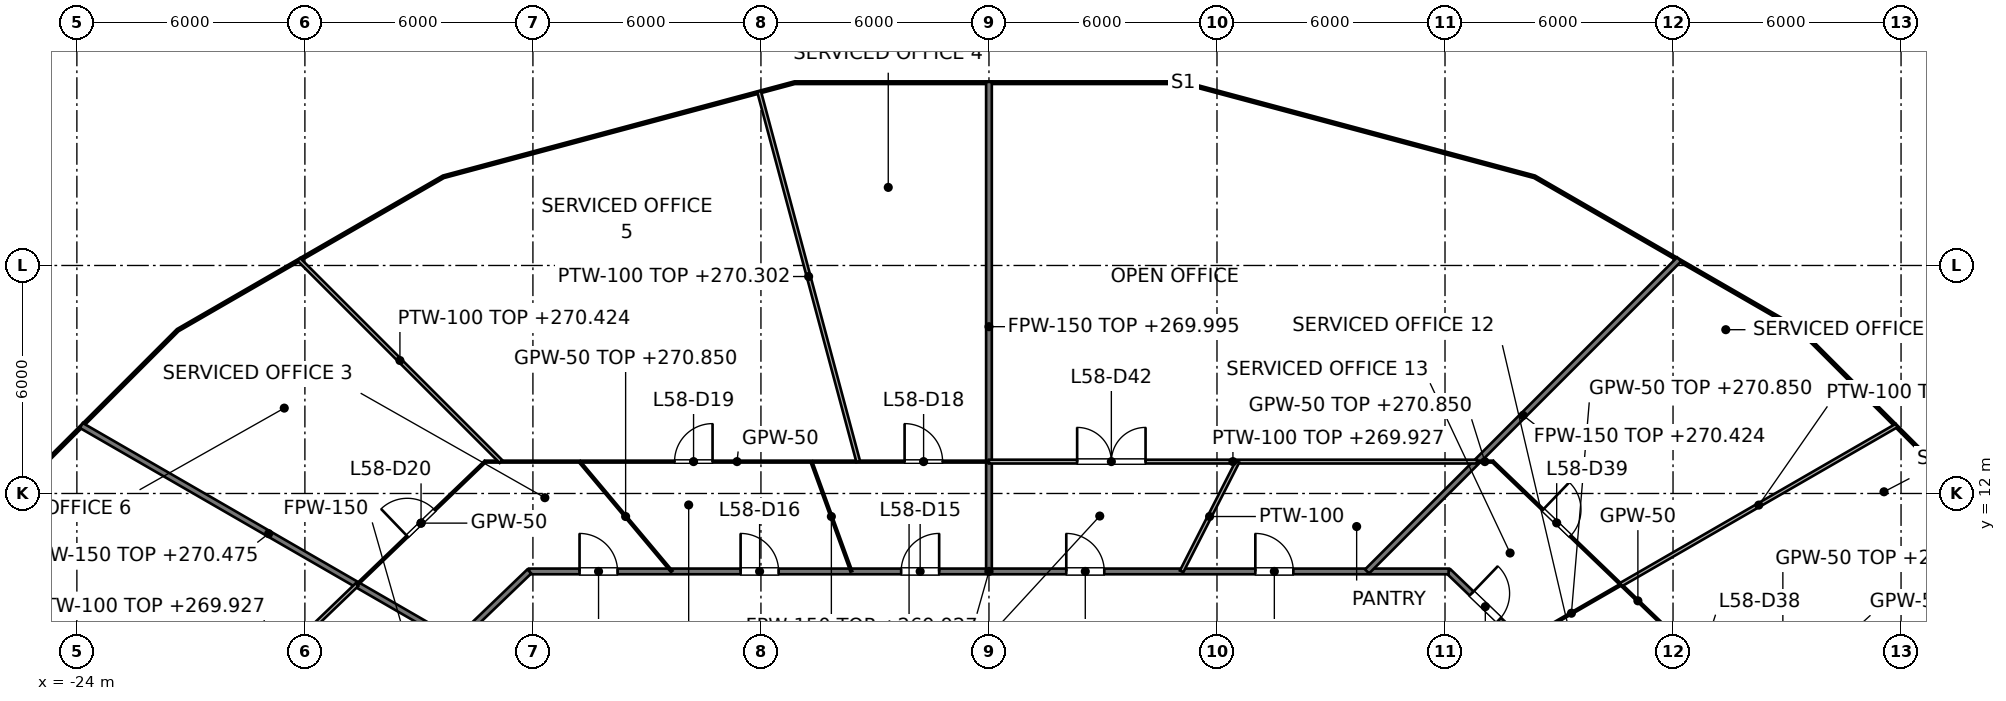
"""IFC4 building model, lengths in metres.
Left out: names, types, materials, properties, quantities, classifications, styles, units other than length and angle.
Written with IfcOpenShell. Run it as: python <this file> out.ifc"""

import sys

from ifc_helpers import new_model, si_unit, direction, frame, frame_2d, origin, place, context, subcontext, project, spatial, rectangle, extrude, element, fill, save


model = new_model("IFC4")
c1 = context("Model", 3, precision=1e-05, world=origin(), true_north=direction((0.0, 1.0)))
c2 = subcontext(c1, "Body", "Model", "MODEL_VIEW")
j1 = project(units=[si_unit("LENGTHUNIT", "METRE"), si_unit("PLANEANGLEUNIT", "RADIAN")], contexts=[c1])
p1 = place(None, origin())
s1 = spatial("IfcSite", under=j1, at=p1, CompositionType="ELEMENT")
p2 = place(p1, origin())
s2 = spatial("IfcBuilding", under=s1, at=p2, CompositionType="ELEMENT")
p3 = place(p2, frame((0.0, 0.0, 267.0)))
s3 = spatial("IfcBuildingStorey", under=s2, at=p3, CompositionType="ELEMENT", Elevation=267.0)
p4 = place(p3, frame((12.095, 9.949, 0.0), z_axis=(0.0, 0.0, 1.0), x_axis=(0.721290181137, -0.692633001376, 0.0)))
e1 = element("IfcWall", 1, at=p4, inside=s3, PredefinedType="PARTITIONING", context=c2, shape_type="SweptSolid", body=[
    extrude(rectangle(XDim=8.187, YDim=0.15, at=frame_2d((4.094, 0.0))), origin(), (0.0, 0.0, 1.0), 2.918),
])
p5 = place(p4, frame((3.232, 0.0, 0.0)))
e2 = element("IfcOpeningElement", 2, at=p5, cuts=e1, PredefinedType="OPENING", context=c2, shape_type="SweptSolid", body=[
    extrude(rectangle(XDim=1.0, YDim=2.1, at=frame_2d((0.5, 1.05))), frame((0.0, 0.075, 0.0), z_axis=(0.0, -1.0, 0.0), x_axis=(1.0, 0.0, 0.0)), (0.0, 0.0, 1.0), 0.15),
])
p6 = place(p4, frame((0.839, 0.0, 0.0)))
e3 = element("IfcOpeningElement", 3, at=p6, cuts=e1, PredefinedType="OPENING", context=c2, shape_type="SweptSolid", body=[
    extrude(rectangle(XDim=1.0, YDim=2.1, at=frame_2d((0.5, 1.05))), frame((0.0, 0.075, 0.0), z_axis=(0.0, -1.0, 0.0), x_axis=(1.0, 0.0, 0.0)), (0.0, 0.0, 1.0), 0.15),
])
p7 = place(p3, frame((-23.883, 13.789, 0.0), z_axis=(0.0, 0.0, 1.0), x_axis=(0.866026665955, -0.499997813851, 0.0)))
e4 = element("IfcWall", 4, at=p7, inside=s3, PredefinedType="PARTITIONING", context=c2, shape_type="SweptSolid", body=[
    extrude(rectangle(XDim=11.384, YDim=0.15, at=frame_2d((5.692, 0.0))), origin(), (0.0, 0.0, 1.0), 3.475),
])
p8 = place(p3, frame((-12.095, 9.949, 0.0), z_axis=(0.0, 0.0, 1.0), x_axis=(1.0, 0.0, 0.0)))
e5 = element("IfcWall", 5, at=p8, inside=s3, PredefinedType="PARTITIONING", context=c2, shape_type="SweptSolid", body=[
    extrude(rectangle(XDim=24.19, YDim=0.15, at=frame_2d((12.095, 0.0))), origin(), (0.0, 0.0, 1.0), 2.927),
])
p9 = place(p8, frame((9.784, 0.0, 0.0)))
e6 = element("IfcOpeningElement", 6, at=p9, cuts=e5, PredefinedType="OPENING", context=c2, shape_type="SweptSolid", body=[
    extrude(rectangle(XDim=1.0, YDim=2.1, at=frame_2d((0.5, 1.05))), frame((0.0, 0.075, 0.0), z_axis=(0.0, -1.0, 0.0), x_axis=(1.0, 0.0, 0.0)), (0.0, 0.0, 1.0), 0.15),
])
p10 = place(p8, frame((5.56, 0.0, 0.0)))
e7 = element("IfcOpeningElement", 7, at=p10, cuts=e5, PredefinedType="OPENING", context=c2, shape_type="SweptSolid", body=[
    extrude(rectangle(XDim=1.0, YDim=2.1, at=frame_2d((0.5, 1.05))), frame((0.0, 0.075, 0.0), z_axis=(0.0, -1.0, 0.0), x_axis=(1.0, 0.0, 0.0)), (0.0, 0.0, 1.0), 0.15),
])
p11 = place(p8, frame((1.322, 0.0, 0.0)))
e8 = element("IfcOpeningElement", 8, at=p11, cuts=e5, PredefinedType="OPENING", context=c2, shape_type="SweptSolid", body=[
    extrude(rectangle(XDim=1.0, YDim=2.1, at=frame_2d((0.5, 1.05))), frame((0.0, 0.075, 0.0), z_axis=(0.0, -1.0, 0.0), x_axis=(1.0, 0.0, 0.0)), (0.0, 0.0, 1.0), 0.15),
])
p12 = place(p8, frame((19.104, 0.0, 0.0)))
e9 = element("IfcOpeningElement", 9, at=p12, cuts=e5, PredefinedType="OPENING", context=c2, shape_type="SweptSolid", body=[
    extrude(rectangle(XDim=1.0, YDim=2.1, at=frame_2d((0.5, 1.05))), frame((0.0, 0.075, 0.0), z_axis=(0.0, -1.0, 0.0), x_axis=(1.0, 0.0, 0.0)), (0.0, 0.0, 1.0), 0.15),
])
p13 = place(p8, frame((14.129, 0.0, 0.0)))
e10 = element("IfcOpeningElement", 10, at=p13, cuts=e5, PredefinedType="OPENING", context=c2, shape_type="SweptSolid", body=[
    extrude(rectangle(XDim=1.0, YDim=2.1, at=frame_2d((0.5, 1.05))), frame((0.0, 0.075, 0.0), z_axis=(0.0, -1.0, 0.0), x_axis=(1.0, 0.0, 0.0)), (0.0, 0.0, 1.0), 0.15),
])
p14 = place(p3, frame((-18.0, 4.278, 0.0), z_axis=(0.0, 0.0, 1.0), x_axis=(0.721260976692, 0.69266341285, 0.0)))
e11 = element("IfcWall", 11, at=p14, inside=s3, PredefinedType="PARTITIONING", context=c2, shape_type="SweptSolid", body=[
    extrude(rectangle(XDim=8.187, YDim=0.15, at=frame_2d((4.094, 0.0))), origin(), (0.0, 0.0, 1.0), 2.918),
])
p15 = place(p14, frame((3.544, 0.0, 0.0)))
e12 = element("IfcOpeningElement", 12, at=p15, cuts=e11, PredefinedType="OPENING", context=c2, shape_type="SweptSolid", body=[
    extrude(rectangle(XDim=1.0, YDim=2.1, at=frame_2d((0.5, 1.05))), frame((0.0, 0.075, 0.0), z_axis=(0.0, -1.0, 0.0), x_axis=(1.0, 0.0, 0.0)), (0.0, 0.0, 1.0), 0.15),
])
p16 = place(p3, frame((9.949, 9.949, 0.0), z_axis=(0.0, 0.0, 1.0), x_axis=(0.707106781187, 0.707106781187, 0.0)))
e13 = element("IfcWall", 13, at=p16, inside=s3, PredefinedType="PARTITIONING", context=c2, shape_type="SweptSolid", body=[
    extrude(rectangle(XDim=11.612, YDim=0.15, at=frame_2d((5.806, 0.0))), origin(), (0.0, 0.0, 1.0), 3.424),
])
p17 = place(p3, frame((0.0, 9.949, 0.0), z_axis=(0.0, 0.0, 1.0), x_axis=(0.0, 1.0, 0.0)))
e14 = element("IfcWall", 14, at=p17, inside=s3, PredefinedType="PARTITIONING", context=c2, shape_type="SweptSolid", body=[
    extrude(rectangle(XDim=12.881, YDim=0.15, at=frame_2d((6.44, 0.0))), origin(), (0.0, 0.0, 1.0), 2.995),
])
p18 = place(p3, frame((-4.673, 12.839, 0.0), z_axis=(0.0, 0.0, 1.0), x_axis=(0.342042598731, -0.939684447383, 0.0)))
e15 = element("IfcWall", 15, at=p18, inside=s3, PredefinedType="PARTITIONING", context=c2, shape_type="SweptSolid", body=[
    extrude(rectangle(XDim=3.076, YDim=0.05, at=frame_2d((1.538, 0.0))), origin(), (0.0, 0.0, 1.0), 3.85),
])
p19 = place(p3, frame((-10.773, 12.839, 0.0), z_axis=(0.0, 0.0, 1.0), x_axis=(0.642777681898, -0.766052773413, 0.0)))
e16 = element("IfcWall", 16, at=p19, inside=s3, PredefinedType="PARTITIONING", context=c2, shape_type="SweptSolid", body=[
    extrude(rectangle(XDim=3.773, YDim=0.05, at=frame_2d((1.886, 0.0))), origin(), (0.0, 0.0, 1.0), 3.85),
])
p20 = place(p3, frame((13.258, 12.839, 0.0), z_axis=(0.0, 0.0, 1.0), x_axis=(0.721469843217, -0.692445857327, 0.0)))
e17 = element("IfcWall", 17, at=p20, inside=s3, PredefinedType="PARTITIONING", context=c2, shape_type="SweptSolid", body=[
    extrude(rectangle(XDim=10.582, YDim=0.05, at=frame_2d((5.291, 0.0))), origin(), (0.0, 0.0, 1.0), 2.927),
])
p21 = place(p20, frame((7.072, 0.0, 0.0)))
e18 = element("IfcOpeningElement", 18, at=p21, cuts=e17, PredefinedType="OPENING", context=c2, shape_type="SweptSolid", body=[
    extrude(rectangle(XDim=1.0, YDim=2.1, at=frame_2d((0.5, 1.05))), frame((0.0, 0.025, 0.0), z_axis=(0.0, -1.0, 0.0), x_axis=(1.0, 0.0, 0.0)), (0.0, 0.0, 1.0), 0.05),
])
p22 = place(p20, frame((1.83, 0.0, 0.0)))
e19 = element("IfcOpeningElement", 19, at=p22, cuts=e17, PredefinedType="OPENING", context=c2, shape_type="SweptSolid", body=[
    extrude(rectangle(XDim=1.0, YDim=2.1, at=frame_2d((0.5, 1.05))), frame((0.0, 0.025, 0.0), z_axis=(0.0, -1.0, 0.0), x_axis=(1.0, 0.0, 0.0)), (0.0, 0.0, 1.0), 0.05),
])
p23 = place(p3, frame((-13.258, 12.839, 0.0), z_axis=(0.0, 0.0, 1.0), x_axis=(1.0, 0.0, 0.0)))
e20 = element("IfcWall", 20, at=p23, inside=s3, PredefinedType="PARTITIONING", context=c2, shape_type="SweptSolid", body=[
    extrude(rectangle(XDim=13.258, YDim=0.05, at=frame_2d((6.629, 0.0))), origin(), (0.0, 0.0, 1.0), 2.927),
])
p24 = place(p23, frame((11.038, 0.0, 0.0)))
e21 = element("IfcOpeningElement", 21, at=p24, cuts=e20, PredefinedType="OPENING", context=c2, shape_type="SweptSolid", body=[
    extrude(rectangle(XDim=1.0, YDim=2.1, at=frame_2d((0.5, 1.05))), frame((0.0, 0.025, 0.0), z_axis=(0.0, -1.0, 0.0), x_axis=(1.0, 0.0, 0.0)), (0.0, 0.0, 1.0), 0.05),
])
p25 = place(p23, frame((4.985, 0.0, 0.0)))
e22 = element("IfcOpeningElement", 22, at=p25, cuts=e20, PredefinedType="OPENING", context=c2, shape_type="SweptSolid", body=[
    extrude(rectangle(XDim=1.0, YDim=2.1, at=frame_2d((0.5, 1.05))), frame((0.0, 0.025, 0.0), z_axis=(0.0, -1.0, 0.0), x_axis=(1.0, 0.0, 0.0)), (0.0, 0.0, 1.0), 0.05),
])
p26 = place(p3, frame((12.839, 12.839, 0.0), z_axis=(0.0, 0.0, 1.0), x_axis=(1.0, 0.0, 0.0)))
e23 = element("IfcWall", 23, at=p26, inside=s3, PredefinedType="PARTITIONING", context=c2, shape_type="SweptSolid", body=[
    extrude(rectangle(XDim=0.419, YDim=0.05, at=frame_2d((0.209, 0.0))), origin(), (0.0, 0.0, 1.0), 3.85),
])
p27 = place(p3, frame((14.024, 8.097, 0.0), z_axis=(0.0, 0.0, 1.0), x_axis=(0.86600176378, 0.500040943453, 0.0)))
e24 = element("IfcWall", 24, at=p27, inside=s3, PredefinedType="PARTITIONING", context=c2, shape_type="SweptSolid", body=[
    extrude(rectangle(XDim=3.008, YDim=0.05, at=frame_2d((1.504, 0.0))), origin(), (0.0, 0.0, 1.0), 3.85),
])
p28 = place(p3, frame((-16.629, 9.601, 0.0), z_axis=(0.0, 0.0, 1.0), x_axis=(0.721171224294, 0.692756858681, 0.0)))
e25 = element("IfcWall", 25, at=p28, inside=s3, PredefinedType="PARTITIONING", context=c2, shape_type="SweptSolid", body=[
    extrude(rectangle(XDim=4.674, YDim=0.05, at=frame_2d((2.337, 0.0))), origin(), (0.0, 0.0, 1.0), 2.927),
])
p29 = place(p28, frame((1.837, 0.0, 0.0)))
e26 = element("IfcOpeningElement", 26, at=p29, cuts=e25, PredefinedType="OPENING", context=c2, shape_type="SweptSolid", body=[
    extrude(rectangle(XDim=1.0, YDim=2.1, at=frame_2d((0.5, 1.05))), frame((0.0, 0.025, 0.0), z_axis=(0.0, -1.0, 0.0), x_axis=(1.0, 0.0, 0.0)), (0.0, 0.0, 1.0), 0.05),
])
p30 = place(p3, frame((-6.05, 22.58, 0.0), z_axis=(0.0, 0.0, 1.0), x_axis=(0.258821194786, -0.965925250281, 0.0)))
e27 = element("IfcWall", 27, at=p30, inside=s3, PredefinedType="PARTITIONING", context=c2, shape_type="SweptSolid", body=[
    extrude(rectangle(XDim=10.085, YDim=0.1, at=frame_2d((5.042, 0.0))), origin(), (0.0, 0.0, 1.0), 3.302),
])
p31 = place(p3, frame((-18.16, 18.16, 0.0), z_axis=(0.0, 0.0, 1.0), x_axis=(0.707106781187, -0.707106781187, 0.0)))
e28 = element("IfcWall", 28, at=p31, inside=s3, PredefinedType="PARTITIONING", context=c2, shape_type="SweptSolid", body=[
    extrude(rectangle(XDim=7.525, YDim=0.1, at=frame_2d((3.762, 0.0))), origin(), (0.0, 0.0, 1.0), 3.424),
])
p32 = place(p3, frame((0.0, 12.839, 0.0), z_axis=(0.0, 0.0, 1.0), x_axis=(1.0, 0.0, 0.0)))
e29 = element("IfcWall", 29, at=p32, inside=s3, PredefinedType="PARTITIONING", context=c2, shape_type="SweptSolid", body=[
    extrude(rectangle(XDim=12.839, YDim=0.1, at=frame_2d((6.419, 0.0))), origin(), (0.0, 0.0, 1.0), 2.927),
])
p33 = place(p32, frame((2.32, 0.0, 0.0)))
e30 = element("IfcOpeningElement", 30, at=p33, cuts=e29, PredefinedType="OPENING", context=c2, shape_type="SweptSolid", body=[
    extrude(rectangle(XDim=1.8, YDim=2.1, at=frame_2d((0.9, 1.05))), frame((0.0, 0.05, 0.0), z_axis=(0.0, -1.0, 0.0), x_axis=(1.0, 0.0, 0.0)), (0.0, 0.0, 1.0), 0.1),
])
p34 = place(p3, frame((16.629, 9.601, 0.0), z_axis=(0.0, 0.0, 1.0), x_axis=(0.866035608203, 0.499982325013, 0.0)))
e31 = element("IfcWall", 31, at=p34, inside=s3, PredefinedType="PARTITIONING", context=c2, shape_type="SweptSolid", body=[
    extrude(rectangle(XDim=8.376, YDim=0.1, at=frame_2d((4.188, 0.0))), origin(), (0.0, 0.0, 1.0), 3.475),
])
p35 = place(p3, frame((-20.89, 5.509, 0.0), z_axis=(0.0, 0.0, 1.0), x_axis=(0.721200651506, 0.69272622317, 0.0)))
e32 = element("IfcWall", 32, at=p35, inside=s3, PredefinedType="PARTITIONING", context=c2, shape_type="SweptSolid", body=[
    extrude(rectangle(XDim=5.907, YDim=0.1, at=frame_2d((2.954, 0.0))), origin(), (0.0, 0.0, 1.0), 2.927),
])
p36 = place(p3, frame((5.069, 9.949, 0.0), z_axis=(0.0, 0.0, 1.0), x_axis=(0.454064453845, 0.890968838823, 0.0)))
e33 = element("IfcWall", 33, at=p36, inside=s3, PredefinedType="PARTITIONING", context=c2, shape_type="SweptSolid", body=[
    extrude(rectangle(XDim=3.244, YDim=0.1, at=frame_2d((1.622, 0.0))), origin(), (0.0, 0.0, 1.0), 3.85),
])
p37 = place(p9, origin())
e34 = element("IfcDoor", 34, at=p37, inside=s3, OperationType="SINGLE_SWING_RIGHT", PredefinedType="DOOR", context=c2, shape_type="SweptSolid", body=[
    extrude(rectangle(XDim=1.0, YDim=2.1, at=frame_2d((0.5, 1.05))), frame((0.0, 0.025, 0.0), z_axis=(0.0, -1.0, 0.0), x_axis=(1.0, 0.0, 0.0)), (0.0, 0.0, 1.0), 0.05),
])
fill(e6, e34)
p38 = place(p10, origin())
e35 = element("IfcDoor", 35, at=p38, inside=s3, OperationType="SINGLE_SWING_LEFT", PredefinedType="DOOR", context=c2, shape_type="SweptSolid", body=[
    extrude(rectangle(XDim=1.0, YDim=2.1, at=frame_2d((0.5, 1.05))), frame((0.0, 0.025, 0.0), z_axis=(0.0, -1.0, 0.0), x_axis=(1.0, 0.0, 0.0)), (0.0, 0.0, 1.0), 0.05),
])
fill(e7, e35)
p39 = place(p11, origin())
e36 = element("IfcDoor", 36, at=p39, inside=s3, OperationType="SINGLE_SWING_LEFT", PredefinedType="DOOR", context=c2, shape_type="SweptSolid", body=[
    extrude(rectangle(XDim=1.0, YDim=2.1, at=frame_2d((0.5, 1.05))), frame((0.0, 0.025, 0.0), z_axis=(0.0, -1.0, 0.0), x_axis=(1.0, 0.0, 0.0)), (0.0, 0.0, 1.0), 0.05),
])
fill(e8, e36)
p40 = place(p24, origin())
e37 = element("IfcDoor", 37, at=p40, inside=s3, OperationType="SINGLE_SWING_LEFT", PredefinedType="DOOR", context=c2, shape_type="SweptSolid", body=[
    extrude(rectangle(XDim=1.0, YDim=2.1, at=frame_2d((0.5, 1.05))), frame((0.0, 0.025, 0.0), z_axis=(0.0, -1.0, 0.0), x_axis=(1.0, 0.0, 0.0)), (0.0, 0.0, 1.0), 0.05),
])
fill(e21, e37)
p41 = place(p25, origin())
e38 = element("IfcDoor", 38, at=p41, inside=s3, OperationType="SINGLE_SWING_RIGHT", PredefinedType="DOOR", context=c2, shape_type="SweptSolid", body=[
    extrude(rectangle(XDim=1.0, YDim=2.1, at=frame_2d((0.5, 1.05))), frame((0.0, 0.025, 0.0), z_axis=(0.0, -1.0, 0.0), x_axis=(1.0, 0.0, 0.0)), (0.0, 0.0, 1.0), 0.05),
])
fill(e22, e38)
p42 = place(p29, origin())
e39 = element("IfcDoor", 39, at=p42, inside=s3, OperationType="SINGLE_SWING_LEFT", PredefinedType="DOOR", context=c2, shape_type="SweptSolid", body=[
    extrude(rectangle(XDim=1.0, YDim=2.1, at=frame_2d((0.5, 1.05))), frame((0.0, 0.025, 0.0), z_axis=(0.0, -1.0, 0.0), x_axis=(1.0, 0.0, 0.0)), (0.0, 0.0, 1.0), 0.05),
])
fill(e26, e39)
p43 = place(p6, origin())
e40 = element("IfcDoor", 40, at=p43, inside=s3, OperationType="SINGLE_SWING_LEFT", PredefinedType="DOOR", context=c2, shape_type="SweptSolid", body=[
    extrude(rectangle(XDim=1.0, YDim=2.1, at=frame_2d((0.5, 1.05))), frame((0.0, 0.025, 0.0), z_axis=(0.0, -1.0, 0.0), x_axis=(1.0, 0.0, 0.0)), (0.0, 0.0, 1.0), 0.05),
])
fill(e3, e40)
p44 = place(p22, origin())
e41 = element("IfcDoor", 41, at=p44, inside=s3, OperationType="SINGLE_SWING_LEFT", PredefinedType="DOOR", context=c2, shape_type="SweptSolid", body=[
    extrude(rectangle(XDim=1.0, YDim=2.1, at=frame_2d((0.5, 1.05))), frame((0.0, 0.025, 0.0), z_axis=(0.0, -1.0, 0.0), x_axis=(1.0, 0.0, 0.0)), (0.0, 0.0, 1.0), 0.05),
])
fill(e19, e41)
p45 = place(p12, origin())
e42 = element("IfcDoor", 42, at=p45, inside=s3, OperationType="SINGLE_SWING_LEFT", PredefinedType="DOOR", context=c2, shape_type="SweptSolid", body=[
    extrude(rectangle(XDim=1.0, YDim=2.1, at=frame_2d((0.5, 1.05))), frame((0.0, 0.025, 0.0), z_axis=(0.0, -1.0, 0.0), x_axis=(1.0, 0.0, 0.0)), (0.0, 0.0, 1.0), 0.05),
])
fill(e9, e42)
p46 = place(p13, origin())
e43 = element("IfcDoor", 43, at=p46, inside=s3, OperationType="SINGLE_SWING_LEFT", PredefinedType="DOOR", context=c2, shape_type="SweptSolid", body=[
    extrude(rectangle(XDim=1.0, YDim=2.1, at=frame_2d((0.5, 1.05))), frame((0.0, 0.025, 0.0), z_axis=(0.0, -1.0, 0.0), x_axis=(1.0, 0.0, 0.0)), (0.0, 0.0, 1.0), 0.05),
])
fill(e10, e43)
p47 = place(p33, origin())
e44 = element("IfcDoor", 44, at=p47, inside=s3, OperationType="DOUBLE_DOOR_SINGLE_SWING", PredefinedType="DOOR", context=c2, shape_type="SweptSolid", body=[
    extrude(rectangle(XDim=1.8, YDim=2.1, at=frame_2d((0.9, 1.05))), frame((0.0, 0.025, 0.0), z_axis=(0.0, -1.0, 0.0), x_axis=(1.0, 0.0, 0.0)), (0.0, 0.0, 1.0), 0.05),
])
fill(e30, e44)
save(model, sys.argv[1])
